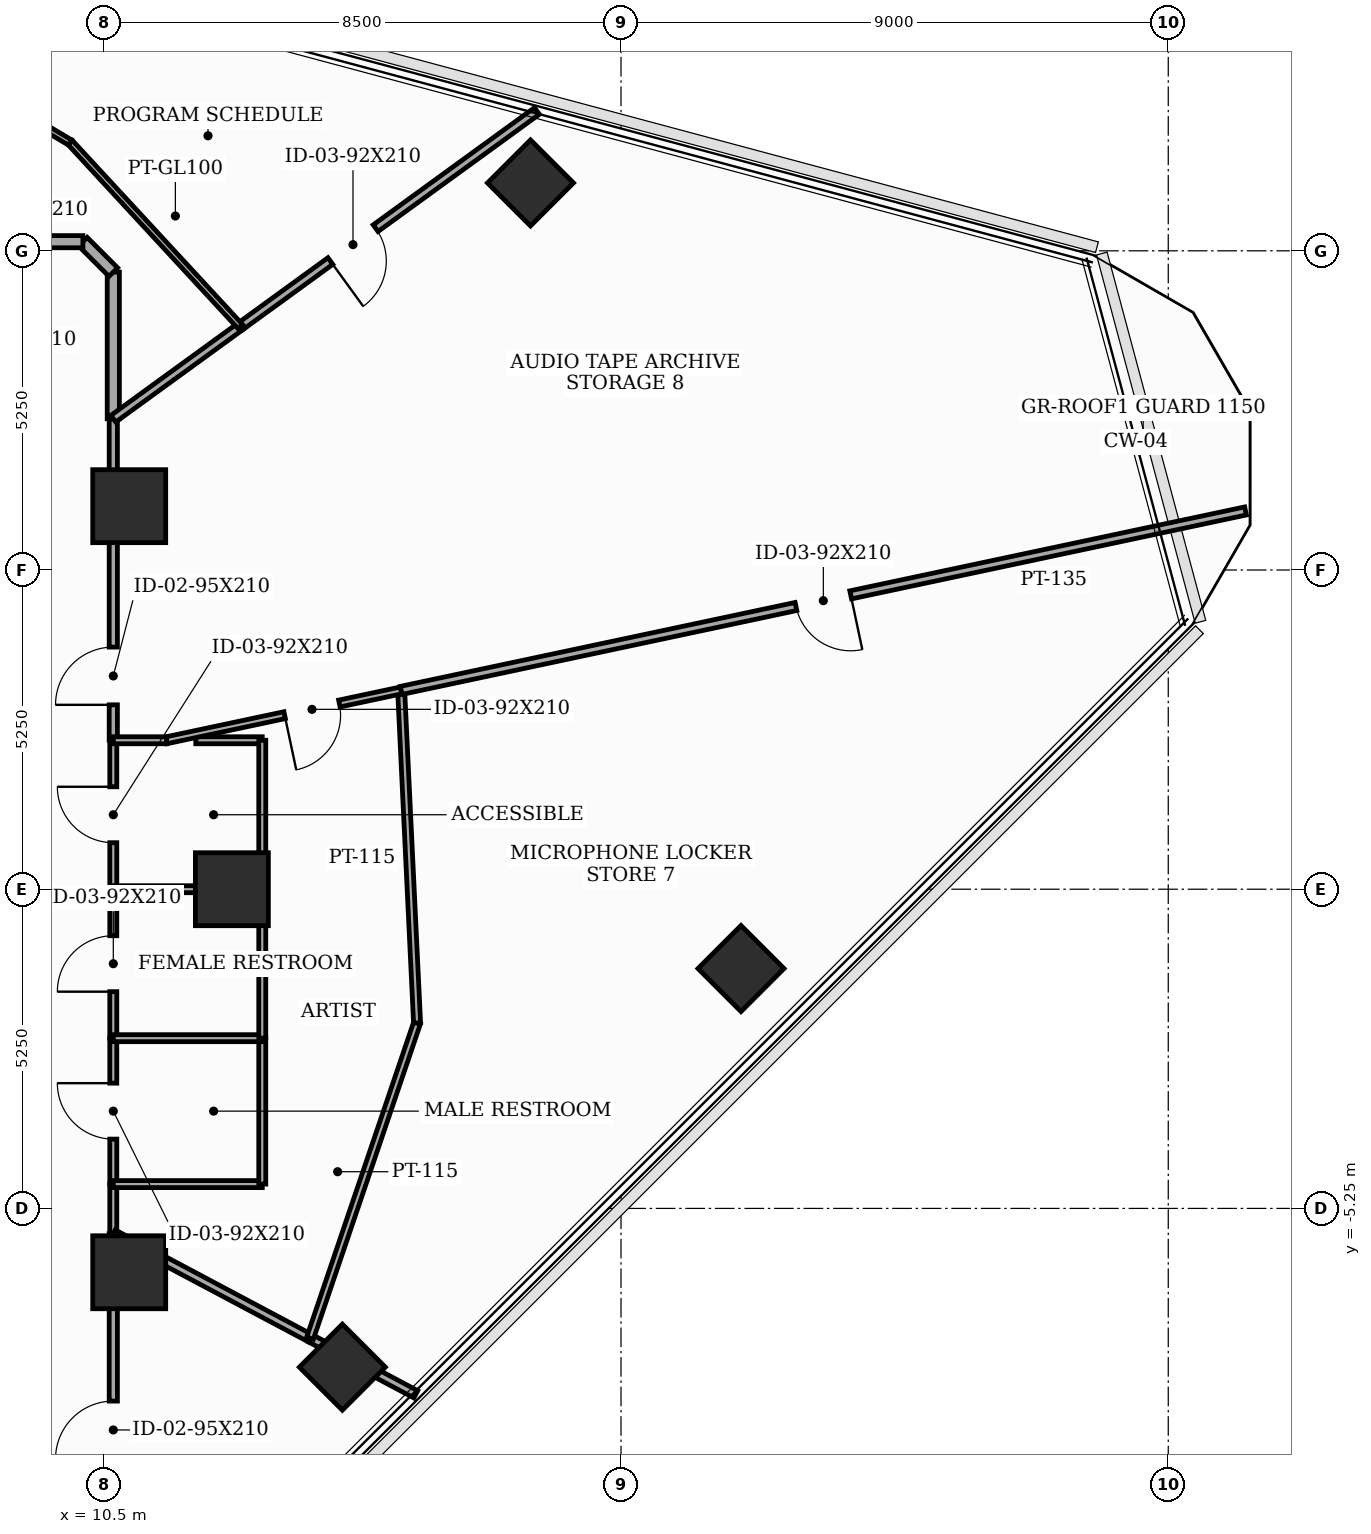
"""IFC4 building model, lengths in metres.
Left out: names, types, materials, properties, quantities, classifications, styles, units other than length and angle.
Written with IfcOpenShell. Run it as: python <this file> out.ifc"""

import sys

from ifc_helpers import new_model, si_unit, direction, frame, frame_2d, origin, origin_2d, place, context, subcontext, project, spatial, rectangle, extrude, element, fill, save


model = new_model("IFC4")
c1 = context("Model", 3, precision=1e-05, world=origin(), true_north=direction((0.0, 1.0)))
c2 = subcontext(c1, "Body", "Model", "MODEL_VIEW")
j1 = project(units=[si_unit("LENGTHUNIT", "METRE"), si_unit("PLANEANGLEUNIT", "RADIAN")], contexts=[c1])
p1 = place(None, origin())
s1 = spatial("IfcSite", under=j1, at=p1, CompositionType="ELEMENT")
p2 = place(p1, origin())
s2 = spatial("IfcBuilding", under=s1, at=p2, CompositionType="ELEMENT")
p3 = place(p2, frame((0.0, 0.0, 187.9)))
s3 = spatial("IfcBuildingStorey", under=s2, at=p3, CompositionType="ELEMENT", Elevation=187.9)
for number, where, z_axis, x_axis in (
    (1, (12.6, 0.0, 0.0), (0.0, 0.0, 1.0), (1.0, 0.0, 0.0)),
    (2, (10.912, 6.3, 0.0), (0.0, 0.0, 1.0), (1.0, 0.0, 0.0)),
    (3, (10.912, -6.3, 0.0), (0.0, 0.0, 1.0), (1.0, 0.0, 0.0)),
):
    element("IfcColumn", number, at=place(p3, frame(where, z_axis=z_axis, x_axis=x_axis)), inside=s3, PredefinedType="COLUMN", context=c2, shape_type="SweptSolid", body=[
        extrude(rectangle(XDim=1.2, YDim=1.2, at=origin_2d()), origin(), (0.0, 0.0, 1.0), 3.7),
    ])
for number, where, z_axis, x_axis in (
    (4, (14.417, -7.861, 0.0), (0.0, 0.0, 1.0), (0.707, 0.707, 0.0)),
    (5, (20.973, -1.305, 0.0), (0.0, 0.0, 1.0), (0.707, 0.707, 0.0)),
    (6, (17.511, 11.616, 0.0), (0.0, 0.0, 1.0), (0.707, 0.707, 0.0)),
):
    element("IfcColumn", number, at=place(p3, frame(where, z_axis=z_axis, x_axis=x_axis)), inside=s3, PredefinedType="COLUMN", context=c2, shape_type="SweptSolid", body=[
        extrude(rectangle(XDim=1.0, YDim=1.0, at=origin_2d()), origin(), (0.0, 0.0, 1.0), 3.7),
    ])
p4 = place(p3, frame((10.65, -10.15, 0.0), z_axis=(0.0, 0.0, 1.0), x_axis=(0.0, 1.0, 0.0)))
e7 = element("IfcWall", 7, at=p4, inside=s3, PredefinedType="PARTITIONING", context=c2, shape_type="SweptSolid", body=[
    extrude(rectangle(XDim=4.487, YDim=0.135, at=frame_2d((2.243, 0.0))), origin(), (0.0, 0.0, 1.0), 2.885),
])
p5 = place(p4, frame((0.781, 0.0, 0.0)))
e8 = element("IfcOpeningElement", 8, at=p5, cuts=e7, PredefinedType="OPENING", context=c2, shape_type="SweptSolid", body=[
    extrude(rectangle(XDim=0.95, YDim=2.1, at=frame_2d((0.475, 1.05))), frame((0.0, 0.077, 0.0), z_axis=(0.0, -1.0, 0.0), x_axis=(1.0, 0.0, 0.0)), (0.0, 0.0, 1.0), 0.155),
])
p6 = place(p3, frame((10.65, -4.85, 0.0), z_axis=(0.0, 0.0, 1.0), x_axis=(0.0, 1.0, 0.0)))
e9 = element("IfcWall", 9, at=p6, inside=s3, PredefinedType="PARTITIONING", context=c2, shape_type="SweptSolid", body=[
    extrude(rectangle(XDim=2.4, YDim=0.115, at=frame_2d((1.2, 0.0))), origin(), (0.0, 0.0, 1.0), 3.5),
])
p7 = place(p6, frame((0.74, 0.0, 0.0)))
e10 = element("IfcOpeningElement", 10, at=p7, cuts=e9, PredefinedType="OPENING", context=c2, shape_type="SweptSolid", body=[
    extrude(rectangle(XDim=0.92, YDim=2.1, at=frame_2d((0.46, 1.05))), frame((0.0, 0.067, 0.0), z_axis=(0.0, -1.0, 0.0), x_axis=(1.0, 0.0, 0.0)), (0.0, 0.0, 1.0), 0.135),
])
p8 = place(p3, frame((10.65, -5.663, 0.0), z_axis=(0.0, 0.0, 1.0), x_axis=(0.0, 1.0, 0.0)))
e11 = element("IfcWall", 11, at=p8, inside=s3, PredefinedType="PARTITIONING", context=c2, shape_type="SweptSolid", body=[
    extrude(rectangle(XDim=0.813, YDim=0.115, at=frame_2d((0.406, 0.0))), origin(), (0.0, 0.0, 1.0), 3.5),
])
p9 = place(p3, frame((10.65, -2.45, 0.0), z_axis=(0.0, 0.0, 1.0), x_axis=(0.0, 1.0, 0.0)))
e12 = element("IfcWall", 12, at=p9, inside=s3, PredefinedType="PARTITIONING", context=c2, shape_type="SweptSolid", body=[
    extrude(rectangle(XDim=2.45, YDim=0.115, at=frame_2d((1.225, 0.0))), origin(), (0.0, 0.0, 1.0), 2.885),
])
p10 = place(p9, frame((0.765, 0.0, 0.0)))
e13 = element("IfcOpeningElement", 13, at=p10, cuts=e12, PredefinedType="OPENING", context=c2, shape_type="SweptSolid", body=[
    extrude(rectangle(XDim=0.92, YDim=2.1, at=frame_2d((0.46, 1.05))), frame((0.0, 0.067, 0.0), z_axis=(0.0, -1.0, 0.0), x_axis=(1.0, 0.0, 0.0)), (0.0, 0.0, 1.0), 0.135),
])
p11 = place(p3, frame((10.65, 0.0, 0.0), z_axis=(0.0, 0.0, 1.0), x_axis=(0.0, 1.0, 0.0)))
e14 = element("IfcWall", 14, at=p11, inside=s3, PredefinedType="PARTITIONING", context=c2, shape_type="SweptSolid", body=[
    extrude(rectangle(XDim=2.45, YDim=0.115, at=frame_2d((1.225, 0.0))), origin(), (0.0, 0.0, 1.0), 2.885),
])
p12 = place(p11, frame((0.765, 0.0, 0.0)))
e15 = element("IfcOpeningElement", 15, at=p12, cuts=e14, PredefinedType="OPENING", context=c2, shape_type="SweptSolid", body=[
    extrude(rectangle(XDim=0.92, YDim=2.1, at=frame_2d((0.46, 1.05))), frame((0.0, 0.067, 0.0), z_axis=(0.0, -1.0, 0.0), x_axis=(1.0, 0.0, 0.0)), (0.0, 0.0, 1.0), 0.135),
])
p13 = place(p3, frame((10.65, 2.45, 0.0), z_axis=(0.0, 0.0, 1.0), x_axis=(0.0, 1.0, 0.0)))
e16 = element("IfcWall", 16, at=p13, inside=s3, PredefinedType="PARTITIONING", context=c2, shape_type="SweptSolid", body=[
    extrude(rectangle(XDim=5.288, YDim=0.135, at=frame_2d((2.644, 0.0))), origin(), (0.0, 0.0, 1.0), 2.885),
])
p14 = place(p13, frame((0.583, 0.0, 0.0)))
e17 = element("IfcOpeningElement", 17, at=p14, cuts=e16, PredefinedType="OPENING", context=c2, shape_type="SweptSolid", body=[
    extrude(rectangle(XDim=0.95, YDim=2.1, at=frame_2d((0.475, 1.05))), frame((0.0, 0.077, 0.0), z_axis=(0.0, -1.0, 0.0), x_axis=(1.0, 0.0, 0.0)), (0.0, 0.0, 1.0), 0.155),
])
p15 = place(p3, frame((10.65, 7.738, 0.0), z_axis=(0.0, 0.0, 1.0), x_axis=(0.0, 1.0, 0.0)))
e18 = element("IfcWall", 18, at=p15, inside=s3, PredefinedType="SOLIDWALL", context=c2, shape_type="SweptSolid", body=[
    extrude(rectangle(XDim=2.412, YDim=0.2, at=frame_2d((1.206, 0.0))), origin(), (0.0, 0.0, 1.0), 3.5),
])
p16 = place(p3, frame((10.65, 10.15, 0.0), z_axis=(0.0, 0.0, 1.0), x_axis=(-0.707106781187, 0.707106781187, 0.0)))
e19 = element("IfcWall", 19, at=p16, inside=s3, PredefinedType="SOLIDWALL", context=c2, shape_type="SweptSolid", body=[
    extrude(rectangle(XDim=0.707, YDim=0.2, at=frame_2d((0.354, 0.0))), origin(), (0.0, 0.0, 1.0), 3.5),
])
p17 = place(p3, frame((10.15, 10.65, 0.0), z_axis=(0.0, 0.0, 1.0), x_axis=(-1.0, 0.0, 0.0)))
e20 = element("IfcWall", 20, at=p17, inside=s3, PredefinedType="SOLIDWALL", context=c2, shape_type="SweptSolid", body=[
    extrude(rectangle(XDim=5.408, YDim=0.2, at=frame_2d((2.704, 0.0))), origin(), (0.0, 0.0, 1.0), 2.885),
])
p18 = place(p17, frame((0.607, 0.0, 0.0)))
e21 = element("IfcOpeningElement", 21, at=p18, cuts=e20, PredefinedType="OPENING", context=c2, shape_type="SweptSolid", body=[
    extrude(rectangle(XDim=0.95, YDim=2.1, at=frame_2d((0.475, 1.05))), frame((0.0, 0.11, 0.0), z_axis=(0.0, -1.0, 0.0), x_axis=(1.0, 0.0, 0.0)), (0.0, 0.0, 1.0), 0.22),
])
p19 = place(p3, frame((13.886, -7.383, 0.0), z_axis=(0.0, 0.0, 1.0), x_axis=(-0.88302513666, 0.469325695041, 0.0)))
e22 = element("IfcWall", 22, at=p19, inside=s3, PredefinedType="PARTITIONING", context=c2, shape_type="SweptSolid", body=[
    extrude(rectangle(XDim=3.665, YDim=0.135, at=frame_2d((1.833, 0.0))), origin(), (0.0, 0.0, 1.0), 2.885),
])
p20 = place(p3, frame((15.625, -8.308, 0.0), z_axis=(0.0, 0.0, 1.0), x_axis=(-0.882966413063, 0.469436165418, 0.0)))
e23 = element("IfcWall", 23, at=p20, inside=s3, PredefinedType="PARTITIONING", context=c2, shape_type="SweptSolid", body=[
    extrude(rectangle(XDim=1.969, YDim=0.135, at=frame_2d((0.985, 0.0))), origin(), (0.0, 0.0, 1.0), 2.985),
])
p21 = place(p3, frame((10.65, -4.85, 0.0), z_axis=(0.0, 0.0, 1.0), x_axis=(1.0, 0.0, 0.0)))
e24 = element("IfcWall", 24, at=p21, inside=s3, PredefinedType="PARTITIONING", context=c2, shape_type="SweptSolid", body=[
    extrude(rectangle(XDim=2.45, YDim=0.115, at=frame_2d((1.225, 0.0))), origin(), (0.0, 0.0, 1.0), 2.885),
])
p22 = place(p3, frame((13.1, -4.85, 0.0), z_axis=(0.0, 0.0, 1.0), x_axis=(0.0, 1.0, 0.0)))
e25 = element("IfcWall", 25, at=p22, inside=s3, PredefinedType="PARTITIONING", context=c2, shape_type="SweptSolid", body=[
    extrude(rectangle(XDim=2.4, YDim=0.115, at=frame_2d((1.2, 0.0))), origin(), (0.0, 0.0, 1.0), 3.5),
])
p23 = place(p3, frame((13.1, -2.45, 0.0), z_axis=(0.0, 0.0, 1.0), x_axis=(-1.0, 0.0, 0.0)))
e26 = element("IfcWall", 26, at=p23, inside=s3, PredefinedType="PARTITIONING", context=c2, shape_type="SweptSolid", body=[
    extrude(rectangle(XDim=2.45, YDim=0.115, at=frame_2d((1.225, 0.0))), origin(), (0.0, 0.0, 1.0), 2.885),
])
p24 = place(p3, frame((13.1, 0.0, 0.0), z_axis=(0.0, 0.0, 1.0), x_axis=(0.0, -1.0, 0.0)))
e27 = element("IfcWall", 27, at=p24, inside=s3, PredefinedType="PARTITIONING", context=c2, shape_type="SweptSolid", body=[
    extrude(rectangle(XDim=2.45, YDim=0.115, at=frame_2d((1.225, 0.0))), origin(), (0.0, 0.0, 1.0), 2.985),
])
p25 = place(p3, frame((13.886, -7.383, 0.0), z_axis=(0.0, 0.0, 1.0), x_axis=(0.321480582018, 0.946916171255, 0.0)))
e28 = element("IfcWall", 28, at=p25, inside=s3, PredefinedType="PARTITIONING", context=c2, shape_type="SweptSolid", body=[
    extrude(rectangle(XDim=5.475, YDim=0.115, at=frame_2d((2.737, 0.0))), origin(), (0.0, 0.0, 1.0), 3.5),
])
p26 = place(p3, frame((15.646, -2.199, 0.0), z_axis=(0.0, 0.0, 1.0), x_axis=(-0.047844791808, 0.998854782187, 0.0)))
e29 = element("IfcWall", 29, at=p26, inside=s3, PredefinedType="PARTITIONING", context=c2, shape_type="SweptSolid", body=[
    extrude(rectangle(XDim=5.475, YDim=0.115, at=frame_2d((2.738, 0.0))), origin(), (0.0, 0.0, 1.0), 2.985),
])
p27 = place(p3, frame((12.007, 2.45, 0.0), z_axis=(0.0, 0.0, 1.0), x_axis=(1.0, 0.0, 0.0)))
e30 = element("IfcWall", 30, at=p27, inside=s3, PredefinedType="PARTITIONING", context=c2, shape_type="SweptSolid", body=[
    extrude(rectangle(XDim=1.093, YDim=0.115, at=frame_2d((0.546, 0.0))), origin(), (0.0, 0.0, 1.0), 2.885),
])
p28 = place(p3, frame((13.1, 2.45, 0.0), z_axis=(0.0, 0.0, 1.0), x_axis=(0.0, -1.0, 0.0)))
e31 = element("IfcWall", 31, at=p28, inside=s3, PredefinedType="PARTITIONING", context=c2, shape_type="SweptSolid", body=[
    extrude(rectangle(XDim=2.45, YDim=0.115, at=frame_2d((1.225, 0.0))), origin(), (0.0, 0.0, 1.0), 2.985),
])
p29 = place(p3, frame((15.384, 3.27, 0.0), z_axis=(0.0, 0.0, 1.0), x_axis=(-0.978147995284, -0.207909834598, 0.0)))
e32 = element("IfcWall", 32, at=p29, inside=s3, PredefinedType="PARTITIONING", context=c2, shape_type="SweptSolid", body=[
    extrude(rectangle(XDim=3.944, YDim=0.115, at=frame_2d((1.972, 0.0))), origin(), (0.0, 0.0, 1.0), 2.885),
])
p30 = place(p29, frame((1.039, 0.0, 0.0)))
e33 = element("IfcOpeningElement", 33, at=p30, cuts=e32, PredefinedType="OPENING", context=c2, shape_type="SweptSolid", body=[
    extrude(rectangle(XDim=0.92, YDim=2.1, at=frame_2d((0.46, 1.05))), frame((0.0, 0.067, 0.0), z_axis=(0.0, -1.0, 0.0), x_axis=(1.0, 0.0, 0.0)), (0.0, 0.0, 1.0), 0.135),
])
p31 = place(p3, frame((13.1, 0.0, 0.0), z_axis=(0.0, 0.0, 1.0), x_axis=(-1.0, 0.0, 0.0)))
e34 = element("IfcWall", 34, at=p31, inside=s3, PredefinedType="PARTITIONING", context=c2, shape_type="SweptSolid", body=[
    extrude(rectangle(XDim=2.45, YDim=0.115, at=frame_2d((1.225, 0.0))), origin(), (0.0, 0.0, 1.0), 2.885),
])
p32 = place(p3, frame((29.271, 6.221, 0.0), z_axis=(0.0, 0.0, 1.0), x_axis=(-0.978151114267, -0.207895160259, 0.0)))
e35 = element("IfcWall", 35, at=p32, inside=s3, PredefinedType="PARTITIONING", context=c2, shape_type="SweptSolid", body=[
    extrude(rectangle(XDim=14.197, YDim=0.135, at=frame_2d((7.098, 0.0))), origin(), (0.0, 0.0, 1.0), 2.985),
])
p33 = place(p32, frame((6.638, 0.0, 0.0)))
e36 = element("IfcOpeningElement", 36, at=p33, cuts=e35, PredefinedType="OPENING", context=c2, shape_type="SweptSolid", body=[
    extrude(rectangle(XDim=0.92, YDim=2.1, at=frame_2d((0.46, 1.05))), frame((0.0, 0.077, 0.0), z_axis=(0.0, -1.0, 0.0), x_axis=(1.0, 0.0, 0.0)), (0.0, 0.0, 1.0), 0.155),
])
p34 = place(p3, frame((11.526, 2.45, 0.0), z_axis=(0.0, 0.0, 1.0), x_axis=(-1.0, 0.0, 0.0)))
e37 = element("IfcWall", 37, at=p34, inside=s3, PredefinedType="PARTITIONING", context=c2, shape_type="SweptSolid", body=[
    extrude(rectangle(XDim=0.876, YDim=0.115, at=frame_2d((0.438, 0.0))), origin(), (0.0, 0.0, 1.0), 3.5),
])
p35 = place(p3, frame((17.617, 12.8, 0.0), z_axis=(0.0, 0.0, 1.0), x_axis=(-0.809021342768, -0.587779267196, 0.0)))
e38 = element("IfcWall", 38, at=p35, inside=s3, PredefinedType="PARTITIONING", context=c2, shape_type="SweptSolid", body=[
    extrude(rectangle(XDim=6.031, YDim=0.135, at=frame_2d((3.015, 0.0))), origin(), (0.0, 0.0, 1.0), 2.985),
])
p36 = place(p35, frame((3.279, 0.0, 0.0)))
e39 = element("IfcOpeningElement", 39, at=p36, cuts=e38, PredefinedType="OPENING", context=c2, shape_type="SweptSolid", body=[
    extrude(rectangle(XDim=0.92, YDim=2.1, at=frame_2d((0.46, 1.05))), frame((0.0, 0.077, 0.0), z_axis=(0.0, -1.0, 0.0), x_axis=(1.0, 0.0, 0.0)), (0.0, 0.0, 1.0), 0.155),
])
p37 = place(p3, frame((12.738, 9.255, 0.0), z_axis=(0.0, 0.0, 1.0), x_axis=(-0.809067292609, -0.587716016483, 0.0)))
e40 = element("IfcWall", 40, at=p37, inside=s3, PredefinedType="PARTITIONING", context=c2, shape_type="SweptSolid", body=[
    extrude(rectangle(XDim=2.581, YDim=0.135, at=frame_2d((1.291, 0.0))), origin(), (0.0, 0.0, 1.0), 3.5),
])
p38 = place(p3, frame((6.404, 14.384, 0.0), z_axis=(0.0, 0.0, 1.0), x_axis=(0.859464079119, -0.511196143085, 0.0)))
e41 = element("IfcWall", 41, at=p38, inside=s3, PredefinedType="MOVABLE", context=c2, shape_type="SweptSolid", body=[
    extrude(rectangle(XDim=4.118, YDim=0.1, at=frame_2d((2.059, 0.0))), origin(), (0.0, 0.0, 1.0), 2.975),
])
p39 = place(p3, frame((9.943, 12.279, 0.0), z_axis=(0.0, 0.0, 1.0), x_axis=(0.678723214903, -0.734394170423, 0.0)))
e42 = element("IfcWall", 42, at=p39, inside=s3, PredefinedType="MOVABLE", context=c2, shape_type="SweptSolid", body=[
    extrude(rectangle(XDim=4.118, YDim=0.1, at=frame_2d((2.059, 0.0))), origin(), (0.0, 0.0, 1.0), 3.5),
])
p40 = place(p5, origin())
e43 = element("IfcDoor", 43, at=p40, inside=s3, OperationType="SINGLE_SWING_LEFT", PredefinedType="DOOR", context=c2, shape_type="SweptSolid", body=[
    extrude(rectangle(XDim=0.95, YDim=2.1, at=frame_2d((0.475, 1.05))), frame((0.0, 0.025, 0.0), z_axis=(0.0, -1.0, 0.0), x_axis=(1.0, 0.0, 0.0)), (0.0, 0.0, 1.0), 0.05),
])
fill(e8, e43)
p41 = place(p7, origin())
e44 = element("IfcDoor", 44, at=p41, inside=s3, OperationType="SINGLE_SWING_RIGHT", PredefinedType="DOOR", context=c2, shape_type="SweptSolid", body=[
    extrude(rectangle(XDim=0.92, YDim=2.1, at=frame_2d((0.46, 1.05))), frame((0.0, 0.025, 0.0), z_axis=(0.0, -1.0, 0.0), x_axis=(1.0, 0.0, 0.0)), (0.0, 0.0, 1.0), 0.05),
])
fill(e10, e44)
p42 = place(p10, origin())
e45 = element("IfcDoor", 45, at=p42, inside=s3, OperationType="SINGLE_SWING_LEFT", PredefinedType="DOOR", context=c2, shape_type="SweptSolid", body=[
    extrude(rectangle(XDim=0.92, YDim=2.1, at=frame_2d((0.46, 1.05))), frame((0.0, 0.025, 0.0), z_axis=(0.0, -1.0, 0.0), x_axis=(1.0, 0.0, 0.0)), (0.0, 0.0, 1.0), 0.05),
])
fill(e13, e45)
p43 = place(p12, origin())
e46 = element("IfcDoor", 46, at=p43, inside=s3, OperationType="SINGLE_SWING_RIGHT", PredefinedType="DOOR", context=c2, shape_type="SweptSolid", body=[
    extrude(rectangle(XDim=0.92, YDim=2.1, at=frame_2d((0.46, 1.05))), frame((0.0, 0.025, 0.0), z_axis=(0.0, -1.0, 0.0), x_axis=(1.0, 0.0, 0.0)), (0.0, 0.0, 1.0), 0.05),
])
fill(e15, e46)
p44 = place(p14, origin())
e47 = element("IfcDoor", 47, at=p44, inside=s3, OperationType="SINGLE_SWING_LEFT", PredefinedType="DOOR", context=c2, shape_type="SweptSolid", body=[
    extrude(rectangle(XDim=0.95, YDim=2.1, at=frame_2d((0.475, 1.05))), frame((0.0, 0.025, 0.0), z_axis=(0.0, -1.0, 0.0), x_axis=(1.0, 0.0, 0.0)), (0.0, 0.0, 1.0), 0.05),
])
fill(e17, e47)
p45 = place(p30, origin())
e48 = element("IfcDoor", 48, at=p45, inside=s3, OperationType="SINGLE_SWING_RIGHT", PredefinedType="DOOR", context=c2, shape_type="SweptSolid", body=[
    extrude(rectangle(XDim=0.92, YDim=2.1, at=frame_2d((0.46, 1.05))), frame((0.0, 0.025, 0.0), z_axis=(0.0, -1.0, 0.0), x_axis=(1.0, 0.0, 0.0)), (0.0, 0.0, 1.0), 0.05),
])
fill(e33, e48)
p46 = place(p33, origin())
e49 = element("IfcDoor", 49, at=p46, inside=s3, OperationType="SINGLE_SWING_LEFT", PredefinedType="DOOR", context=c2, shape_type="SweptSolid", body=[
    extrude(rectangle(XDim=0.92, YDim=2.1, at=frame_2d((0.46, 1.05))), frame((0.0, 0.025, 0.0), z_axis=(0.0, -1.0, 0.0), x_axis=(1.0, 0.0, 0.0)), (0.0, 0.0, 1.0), 0.05),
])
fill(e36, e49)
p47 = place(p36, origin())
e50 = element("IfcDoor", 50, at=p47, inside=s3, OperationType="SINGLE_SWING_RIGHT", PredefinedType="DOOR", context=c2, shape_type="SweptSolid", body=[
    extrude(rectangle(XDim=0.92, YDim=2.1, at=frame_2d((0.46, 1.05))), frame((0.0, 0.025, 0.0), z_axis=(0.0, -1.0, 0.0), x_axis=(1.0, 0.0, 0.0)), (0.0, 0.0, 1.0), 0.05),
])
fill(e39, e50)
save(model, sys.argv[1])
